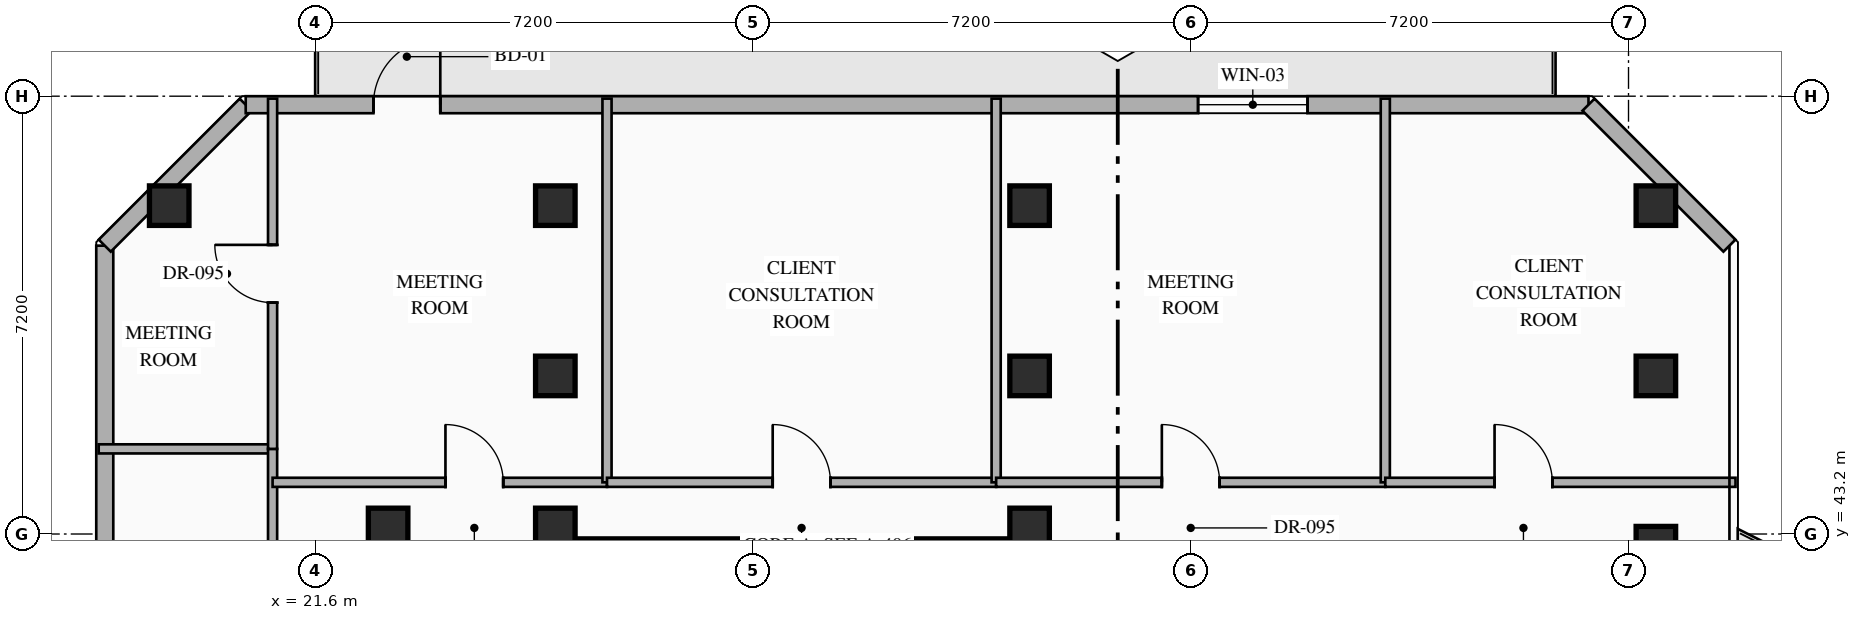
"""IFC4 building model, lengths in metres.
Left out: names, types, materials, properties, quantities, classifications, styles, units other than length and angle.
Written with IfcOpenShell. Run it as: python <this file> out.ifc"""

import sys

from ifc_helpers import new_model, si_unit, direction, frame, frame_2d, origin, origin_2d, place, context, subcontext, project, spatial, rectangle, hollow_rectangle, extrude, element, fill, save


model = new_model("IFC4")
c1 = context("Model", 3, precision=1e-05, world=origin(), true_north=direction((0.0, 1.0)))
c2 = subcontext(c1, "Body", "Model", "MODEL_VIEW")
j1 = project(units=[si_unit("LENGTHUNIT", "METRE"), si_unit("PLANEANGLEUNIT", "RADIAN")], contexts=[c1])
p1 = place(None, origin())
s1 = spatial("IfcSite", under=j1, at=p1, CompositionType="ELEMENT")
p2 = place(p1, origin())
s2 = spatial("IfcBuilding", under=s1, at=p2, CompositionType="ELEMENT")
p3 = place(p2, frame((0.0, 0.0, 246.75)))
s3 = spatial("IfcBuildingStorey", under=s2, at=p3, CompositionType="ELEMENT", Elevation=246.75)
p4 = place(p3, frame((25.77, 42.895, 0.0), z_axis=(0.0, 0.0, 1.0), x_axis=(1.0, 0.0, 0.0)))
e1 = element("IfcWall", 1, at=p4, inside=s3, PredefinedType="SHEAR", context=c2, shape_type="SweptSolid", body=[
    extrude(rectangle(XDim=7.48, YDim=0.45, at=frame_2d((3.74, 0.0))), origin(), (0.0, 0.0, 1.0), 3.6),
])
for number, where, z_axis, x_axis in (
    (2, (25.55, 43.3, 0.0), (0.0, 0.0, 1.0), (1.0, 0.0, 0.0)),
    (3, (33.35, 43.3, 0.0), (0.0, 0.0, 1.0), (1.0, 0.0, 0.0)),
    (4, (43.65, 43.0, 0.0), (0.0, 0.0, 1.0), (1.0, 0.0, 0.0)),
    (5, (25.55, 45.8, 0.0), (0.0, 0.0, 1.0), (1.0, 0.0, 0.0)),
    (6, (33.35, 45.8, 0.0), (0.0, 0.0, 1.0), (1.0, 0.0, 0.0)),
    (7, (43.65, 45.8, 0.0), (0.0, 0.0, 1.0), (1.0, 0.0, 0.0)),
    (8, (19.2, 48.6, 0.0), (0.0, 0.0, 1.0), (1.0, 0.0, 0.0)),
    (9, (25.55, 48.6, 0.0), (0.0, 0.0, 1.0), (1.0, 0.0, 0.0)),
    (10, (33.35, 48.6, 0.0), (0.0, 0.0, 1.0), (1.0, 0.0, 0.0)),
    (11, (43.65, 48.6, 0.0), (0.0, 0.0, 1.0), (1.0, 0.0, 0.0)),
    (12, (22.8, 43.3, 0.0), (0.0, 0.0, 1.0), (1.0, 0.0, 0.0)),
):
    element("IfcColumn", number, at=place(p3, frame(where, z_axis=z_axis, x_axis=x_axis)), inside=s3, PredefinedType="COLUMN", context=c2, shape_type="SweptSolid", body=[
        extrude(hollow_rectangle(XDim=0.65, YDim=0.65, WallThickness=0.025, at=origin_2d()), origin(), (0.0, 0.0, 1.0), 3.6),
    ])
p5 = place(p3, frame((18.14, 25.858, 0.0), z_axis=(0.0, 0.0, 1.0), x_axis=(0.0, 1.0, 0.0)))
e13 = element("IfcWall", 13, at=p5, inside=s3, PredefinedType="STANDARD", context=c2, shape_type="SweptSolid", body=[
    extrude(rectangle(XDim=22.084, YDim=0.28, at=frame_2d((11.042, 0.0))), origin(), (0.0, 0.0, 1.0), 3.35),
])
p6 = place(p3, frame((18.14, 47.942, 0.0), z_axis=(0.0, 0.0, 1.0), x_axis=(0.707106781187, 0.707106781187, 0.0)))
e14 = element("IfcWall", 14, at=p6, inside=s3, PredefinedType="STANDARD", context=c2, shape_type="SweptSolid", body=[
    extrude(rectangle(XDim=3.278, YDim=0.28, at=frame_2d((1.639, 0.0))), origin(), (0.0, 0.0, 1.0), 3.35),
])
p7 = place(p3, frame((20.458, 50.26, 0.0), z_axis=(0.0, 0.0, 1.0), x_axis=(1.0, 0.0, 0.0)))
e15 = element("IfcWall", 15, at=p7, inside=s3, PredefinedType="STANDARD", context=c2, shape_type="SweptSolid", body=[
    extrude(rectangle(XDim=22.084, YDim=0.28, at=frame_2d((11.042, 0.0))), origin(), (0.0, 0.0, 1.0), 3.35),
])
p8 = place(p7, frame((2.1, 0.0, 0.0)))
e16 = element("IfcOpeningElement", 16, at=p8, cuts=e15, PredefinedType="OPENING", context=c2, shape_type="SweptSolid", body=[
    extrude(rectangle(XDim=1.1, YDim=2.2, at=frame_2d((0.55, 1.1))), frame((0.0, 0.15, 0.0), z_axis=(0.0, -1.0, 0.0), x_axis=(1.0, 0.0, 0.0)), (0.0, 0.0, 1.0), 0.3),
])
p9 = place(p7, frame((15.663, 0.0, 0.85)))
e17 = element("IfcOpeningElement", 17, at=p9, cuts=e15, PredefinedType="OPENING", context=c2, shape_type="SweptSolid", body=[
    extrude(rectangle(XDim=1.8, YDim=2.1, at=frame_2d((0.9, 1.05))), frame((0.0, 0.15, 0.0), z_axis=(0.0, -1.0, 0.0), x_axis=(1.0, 0.0, 0.0)), (0.0, 0.0, 1.0), 0.3),
])
p10 = place(p3, frame((42.542, 50.26, 0.0), z_axis=(0.0, 0.0, 1.0), x_axis=(0.707106781187, -0.707106781187, 0.0)))
e18 = element("IfcWall", 18, at=p10, inside=s3, PredefinedType="STANDARD", context=c2, shape_type="SweptSolid", body=[
    extrude(rectangle(XDim=3.278, YDim=0.28, at=frame_2d((1.639, 0.0))), origin(), (0.0, 0.0, 1.0), 3.35),
])
p11 = place(p3, frame((18.04, 44.6, 0.0), z_axis=(0.0, 0.0, 1.0), x_axis=(1.0, 0.0, 0.0)))
e19 = element("IfcWall", 19, at=p11, inside=s3, PredefinedType="PARTITIONING", context=c2, shape_type="SweptSolid", body=[
    extrude(rectangle(XDim=2.86, YDim=0.15, at=frame_2d((1.43, 0.0))), origin(), (0.0, 0.0, 1.0), 3.35),
])
p12 = place(p3, frame((20.9, 38.2, 0.0), z_axis=(0.0, 0.0, 1.0), x_axis=(0.0, 1.0, 0.0)))
e20 = element("IfcWall", 20, at=p12, inside=s3, PredefinedType="PARTITIONING", context=c2, shape_type="SweptSolid", body=[
    extrude(rectangle(XDim=6.4, YDim=0.15, at=frame_2d((3.2, 0.0))), origin(), (0.0, 0.0, 1.0), 3.35),
])
p13 = place(p12, frame((2.49, 0.0, 0.0)))
e21 = element("IfcOpeningElement", 21, at=p13, cuts=e20, PredefinedType="OPENING", context=c2, shape_type="SweptSolid", body=[
    extrude(rectangle(XDim=0.95, YDim=2.15, at=frame_2d((0.475, 1.075))), frame((0.0, 0.085, 0.0), z_axis=(0.0, -1.0, 0.0), x_axis=(1.0, 0.0, 0.0)), (0.0, 0.0, 1.0), 0.17),
])
p14 = place(p3, frame((20.9, 44.6, 0.0), z_axis=(0.0, 0.0, 1.0), x_axis=(0.0, 1.0, 0.0)))
e22 = element("IfcWall", 22, at=p14, inside=s3, PredefinedType="PARTITIONING", context=c2, shape_type="SweptSolid", body=[
    extrude(rectangle(XDim=5.76, YDim=0.15, at=frame_2d((2.88, 0.0))), origin(), (0.0, 0.0, 1.0), 3.35),
])
p15 = place(p14, frame((2.405, 0.0, 0.0)))
e23 = element("IfcOpeningElement", 23, at=p15, cuts=e22, PredefinedType="OPENING", context=c2, shape_type="SweptSolid", body=[
    extrude(rectangle(XDim=0.95, YDim=2.15, at=frame_2d((0.475, 1.075))), frame((0.0, 0.085, 0.0), z_axis=(0.0, -1.0, 0.0), x_axis=(1.0, 0.0, 0.0)), (0.0, 0.0, 1.0), 0.17),
])
p16 = place(p3, frame((20.9, 44.05, 0.0), z_axis=(0.0, 0.0, 1.0), x_axis=(1.0, 0.0, 0.0)))
e24 = element("IfcWall", 24, at=p16, inside=s3, PredefinedType="PARTITIONING", context=c2, shape_type="SweptSolid", body=[
    extrude(rectangle(XDim=5.5, YDim=0.15, at=frame_2d((2.75, 0.0))), origin(), (0.0, 0.0, 1.0), 3.35),
])
p17 = place(p16, frame((2.843, 0.0, 0.0)))
e25 = element("IfcOpeningElement", 25, at=p17, cuts=e24, PredefinedType="OPENING", context=c2, shape_type="SweptSolid", body=[
    extrude(rectangle(XDim=0.95, YDim=2.15, at=frame_2d((0.475, 1.075))), frame((0.0, 0.085, 0.0), z_axis=(0.0, -1.0, 0.0), x_axis=(1.0, 0.0, 0.0)), (0.0, 0.0, 1.0), 0.17),
])
p18 = place(p3, frame((26.4, 44.05, 0.0), z_axis=(0.0, 0.0, 1.0), x_axis=(0.0, 1.0, 0.0)))
e26 = element("IfcWall", 26, at=p18, inside=s3, PredefinedType="PARTITIONING", context=c2, shape_type="SweptSolid", body=[
    extrude(rectangle(XDim=6.31, YDim=0.15, at=frame_2d((3.155, 0.0))), origin(), (0.0, 0.0, 1.0), 3.35),
])
p19 = place(p3, frame((26.4, 44.05, 0.0), z_axis=(0.0, 0.0, 1.0), x_axis=(1.0, 0.0, 0.0)))
e27 = element("IfcWall", 27, at=p19, inside=s3, PredefinedType="PARTITIONING", context=c2, shape_type="SweptSolid", body=[
    extrude(rectangle(XDim=6.4, YDim=0.15, at=frame_2d((3.2, 0.0))), origin(), (0.0, 0.0, 1.0), 3.35),
])
p20 = place(p19, frame((2.725, 0.0, 0.0)))
e28 = element("IfcOpeningElement", 28, at=p20, cuts=e27, PredefinedType="OPENING", context=c2, shape_type="SweptSolid", body=[
    extrude(rectangle(XDim=0.95, YDim=2.15, at=frame_2d((0.475, 1.075))), frame((0.0, 0.085, 0.0), z_axis=(0.0, -1.0, 0.0), x_axis=(1.0, 0.0, 0.0)), (0.0, 0.0, 1.0), 0.17),
])
p21 = place(p3, frame((32.8, 44.05, 0.0), z_axis=(0.0, 0.0, 1.0), x_axis=(0.0, 1.0, 0.0)))
e29 = element("IfcWall", 29, at=p21, inside=s3, PredefinedType="PARTITIONING", context=c2, shape_type="SweptSolid", body=[
    extrude(rectangle(XDim=6.31, YDim=0.15, at=frame_2d((3.155, 0.0))), origin(), (0.0, 0.0, 1.0), 3.35),
])
p22 = place(p3, frame((32.8, 44.05, 0.0), z_axis=(0.0, 0.0, 1.0), x_axis=(1.0, 0.0, 0.0)))
e30 = element("IfcWall", 30, at=p22, inside=s3, PredefinedType="PARTITIONING", context=c2, shape_type="SweptSolid", body=[
    extrude(rectangle(XDim=6.4, YDim=0.15, at=frame_2d((3.2, 0.0))), origin(), (0.0, 0.0, 1.0), 3.35),
])
p23 = place(p22, frame((2.725, 0.0, 0.0)))
e31 = element("IfcOpeningElement", 31, at=p23, cuts=e30, PredefinedType="OPENING", context=c2, shape_type="SweptSolid", body=[
    extrude(rectangle(XDim=0.95, YDim=2.15, at=frame_2d((0.475, 1.075))), frame((0.0, 0.085, 0.0), z_axis=(0.0, -1.0, 0.0), x_axis=(1.0, 0.0, 0.0)), (0.0, 0.0, 1.0), 0.17),
])
p24 = place(p3, frame((39.2, 44.05, 0.0), z_axis=(0.0, 0.0, 1.0), x_axis=(0.0, 1.0, 0.0)))
e32 = element("IfcWall", 32, at=p24, inside=s3, PredefinedType="PARTITIONING", context=c2, shape_type="SweptSolid", body=[
    extrude(rectangle(XDim=6.31, YDim=0.15, at=frame_2d((3.155, 0.0))), origin(), (0.0, 0.0, 1.0), 3.35),
])
p25 = place(p3, frame((39.2, 44.05, 0.0), z_axis=(0.0, 0.0, 1.0), x_axis=(1.0, 0.0, 0.0)))
e33 = element("IfcWall", 33, at=p25, inside=s3, PredefinedType="PARTITIONING", context=c2, shape_type="SweptSolid", body=[
    extrude(rectangle(XDim=5.76, YDim=0.15, at=frame_2d((2.88, 0.0))), origin(), (0.0, 0.0, 1.0), 3.35),
])
p26 = place(p25, frame((1.797, 0.0, 0.0)))
e34 = element("IfcOpeningElement", 34, at=p26, cuts=e33, PredefinedType="OPENING", context=c2, shape_type="SweptSolid", body=[
    extrude(rectangle(XDim=0.95, YDim=2.15, at=frame_2d((0.475, 1.075))), frame((0.0, 0.085, 0.0), z_axis=(0.0, -1.0, 0.0), x_axis=(1.0, 0.0, 0.0)), (0.0, 0.0, 1.0), 0.17),
])
p27 = place(p8, origin())
e35 = element("IfcDoor", 35, at=p27, inside=s3, OperationType="SINGLE_SWING_RIGHT", PredefinedType="DOOR", context=c2, shape_type="SweptSolid", body=[
    extrude(rectangle(XDim=1.1, YDim=2.2, at=frame_2d((0.55, 1.1))), frame((0.0, 0.025, 0.0), z_axis=(0.0, -1.0, 0.0), x_axis=(1.0, 0.0, 0.0)), (0.0, 0.0, 1.0), 0.05),
])
fill(e16, e35)
p28 = place(p9, origin())
e36 = element("IfcWindow", 36, at=p28, inside=s3, PartitioningType="SINGLE_PANEL", PredefinedType="WINDOW", context=c2, shape_type="SweptSolid", body=[
    extrude(rectangle(XDim=1.8, YDim=2.1, at=frame_2d((0.9, 1.05))), frame((0.0, 0.03, 0.0), z_axis=(0.0, -1.0, 0.0), x_axis=(1.0, 0.0, 0.0)), (0.0, 0.0, 1.0), 0.06),
])
fill(e17, e36)
p29 = place(p15, origin())
e37 = element("IfcDoor", 37, at=p29, inside=s3, OperationType="SINGLE_SWING_RIGHT", PredefinedType="DOOR", context=c2, shape_type="SweptSolid", body=[
    extrude(rectangle(XDim=0.95, YDim=2.15, at=frame_2d((0.475, 1.075))), frame((0.0, 0.025, 0.0), z_axis=(0.0, -1.0, 0.0), x_axis=(1.0, 0.0, 0.0)), (0.0, 0.0, 1.0), 0.05),
])
fill(e23, e37)
p30 = place(p17, origin())
e38 = element("IfcDoor", 38, at=p30, inside=s3, OperationType="SINGLE_SWING_LEFT", PredefinedType="DOOR", context=c2, shape_type="SweptSolid", body=[
    extrude(rectangle(XDim=0.95, YDim=2.15, at=frame_2d((0.475, 1.075))), frame((0.0, 0.025, 0.0), z_axis=(0.0, -1.0, 0.0), x_axis=(1.0, 0.0, 0.0)), (0.0, 0.0, 1.0), 0.05),
])
fill(e25, e38)
p31 = place(p20, origin())
e39 = element("IfcDoor", 39, at=p31, inside=s3, OperationType="SINGLE_SWING_LEFT", PredefinedType="DOOR", context=c2, shape_type="SweptSolid", body=[
    extrude(rectangle(XDim=0.95, YDim=2.15, at=frame_2d((0.475, 1.075))), frame((0.0, 0.025, 0.0), z_axis=(0.0, -1.0, 0.0), x_axis=(1.0, 0.0, 0.0)), (0.0, 0.0, 1.0), 0.05),
])
fill(e28, e39)
p32 = place(p23, origin())
e40 = element("IfcDoor", 40, at=p32, inside=s3, OperationType="SINGLE_SWING_LEFT", PredefinedType="DOOR", context=c2, shape_type="SweptSolid", body=[
    extrude(rectangle(XDim=0.95, YDim=2.15, at=frame_2d((0.475, 1.075))), frame((0.0, 0.025, 0.0), z_axis=(0.0, -1.0, 0.0), x_axis=(1.0, 0.0, 0.0)), (0.0, 0.0, 1.0), 0.05),
])
fill(e31, e40)
p33 = place(p26, origin())
e41 = element("IfcDoor", 41, at=p33, inside=s3, OperationType="SINGLE_SWING_LEFT", PredefinedType="DOOR", context=c2, shape_type="SweptSolid", body=[
    extrude(rectangle(XDim=0.95, YDim=2.15, at=frame_2d((0.475, 1.075))), frame((0.0, 0.025, 0.0), z_axis=(0.0, -1.0, 0.0), x_axis=(1.0, 0.0, 0.0)), (0.0, 0.0, 1.0), 0.05),
])
fill(e34, e41)
save(model, sys.argv[1])
